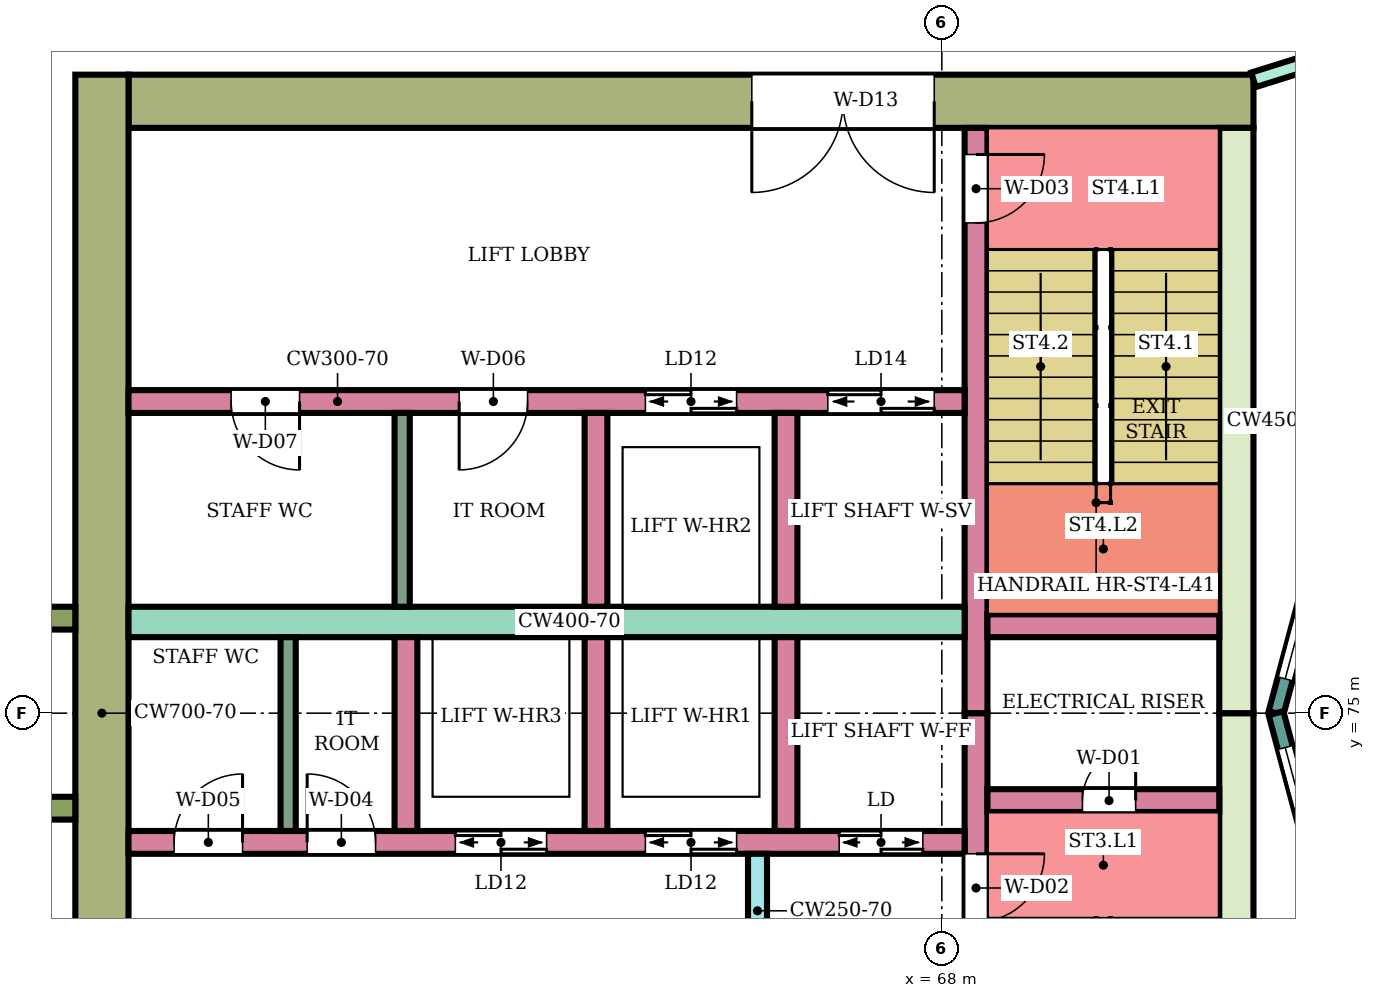
"""IFC4 building model, lengths in metres.
Left out: names, types, materials, properties, quantities, classifications, styles, units other than length and angle.
Written with IfcOpenShell. Run it as: python <this file> out.ifc"""

import sys

from ifc_helpers import new_model, si_unit, direction, frame, frame_2d, origin, place, context, subcontext, project, spatial, rectangle, extrude, element, fill, save


model = new_model("IFC4")
c1 = context("Model", 3, precision=1e-05, world=origin(), true_north=direction((0.0, 1.0)))
c2 = subcontext(c1, "Body", "Model", "MODEL_VIEW")
j1 = project(units=[si_unit("LENGTHUNIT", "METRE"), si_unit("PLANEANGLEUNIT", "RADIAN")], contexts=[c1])
p1 = place(None, origin())
s1 = spatial("IfcSite", under=j1, at=p1, CompositionType="ELEMENT")
p2 = place(p1, origin())
s2 = spatial("IfcBuilding", under=s1, at=p2, CompositionType="ELEMENT")
p3 = place(p2, frame((0.0, 0.0, 178.2)))
s3 = spatial("IfcBuildingStorey", under=s2, at=p3, CompositionType="ELEMENT", Elevation=178.2)
p4 = place(p3, frame((72.1, 83.05, 0.0), z_axis=(0.0, 0.0, 1.0), x_axis=(-1.0, 0.0, 0.0)))
e1 = element("IfcWall", 1, at=p4, inside=s3, PredefinedType="SHEAR", context=c2, shape_type="SweptSolid", body=[
    extrude(rectangle(XDim=14.8, YDim=0.7, at=frame_2d((7.4, 0.0))), origin(), (0.0, 0.0, 1.0), 3.78),
])
p5 = place(p4, frame((4.2, 0.0, 0.0)))
e2 = element("IfcOpeningElement", 2, at=p5, cuts=e1, PredefinedType="OPENING", context=c2, shape_type="SweptSolid", body=[
    extrude(rectangle(XDim=2.4, YDim=2.4, at=frame_2d((1.2, 1.2))), frame((0.0, 0.36, 0.0), z_axis=(0.0, -1.0, 0.0), x_axis=(1.0, 0.0, 0.0)), (0.0, 0.0, 1.0), 0.72),
])
for number, where, z_axis, x_axis in (
    (3, (71.875, 75.0, 0.0), (0.0, 0.0, 1.0), (0.0, -1.0, 0.0)),
    (4, (71.875, 82.7, 0.0), (0.0, 0.0, 1.0), (0.0, -1.0, 0.0)),
):
    element("IfcWall", number, at=place(p3, frame(where, z_axis=z_axis, x_axis=x_axis)), inside=s3, PredefinedType="SHEAR", context=c2, shape_type="SweptSolid", body=[
        extrude(rectangle(XDim=7.7, YDim=0.45, at=frame_2d((3.85, 0.0))), origin(), (0.0, 0.0, 1.0), 3.78),
    ])
p6 = place(p3, frame((56.95, 83.4, 0.0), z_axis=(0.0, 0.0, 1.0), x_axis=(0.0, -1.0, 0.0)))
e5 = element("IfcWall", 5, at=p6, inside=s3, PredefinedType="SHEAR", context=c2, shape_type="SweptSolid", body=[
    extrude(rectangle(XDim=16.8, YDim=0.7, at=frame_2d((8.4, 0.0))), origin(), (0.0, 0.0, 1.0), 3.78),
])
p7 = place(p3, frame((68.45, 75.0, 0.0), z_axis=(0.0, 0.0, 1.0), x_axis=(0.0, -1.0, 0.0)))
e6 = element("IfcWall", 6, at=p7, inside=s3, PredefinedType="SHEAR", context=c2, shape_type="SweptSolid", body=[
    extrude(rectangle(XDim=7.7, YDim=0.3, at=frame_2d((3.85, 0.0))), origin(), (0.0, 0.0, 1.0), 3.78),
])
p8 = place(p7, frame((1.85, 0.0, 0.0)))
e7 = element("IfcOpeningElement", 7, at=p8, cuts=e6, PredefinedType="OPENING", context=c2, shape_type="SweptSolid", body=[
    extrude(rectangle(XDim=0.9, YDim=2.1, at=frame_2d((0.45, 1.05))), frame((0.0, 0.16, 0.0), z_axis=(0.0, -1.0, 0.0), x_axis=(1.0, 0.0, 0.0)), (0.0, 0.0, 1.0), 0.32),
])
p9 = place(p3, frame((68.45, 82.7, 0.0), z_axis=(0.0, 0.0, 1.0), x_axis=(0.0, -1.0, 0.0)))
e8 = element("IfcWall", 8, at=p9, inside=s3, PredefinedType="SHEAR", context=c2, shape_type="SweptSolid", body=[
    extrude(rectangle(XDim=7.7, YDim=0.3, at=frame_2d((3.85, 0.0))), origin(), (0.0, 0.0, 1.0), 3.78),
])
p10 = place(p9, frame((0.35, 0.0, 0.0)))
e9 = element("IfcOpeningElement", 9, at=p10, cuts=e8, PredefinedType="OPENING", context=c2, shape_type="SweptSolid", body=[
    extrude(rectangle(XDim=0.9, YDim=2.1, at=frame_2d((0.45, 1.05))), frame((0.0, 0.16, 0.0), z_axis=(0.0, -1.0, 0.0), x_axis=(1.0, 0.0, 0.0)), (0.0, 0.0, 1.0), 0.32),
])
p11 = place(p3, frame((71.65, 73.85, 0.0), z_axis=(0.0, 0.0, 1.0), x_axis=(-1.0, 0.0, 0.0)))
e10 = element("IfcWall", 10, at=p11, inside=s3, PredefinedType="SHEAR", context=c2, shape_type="SweptSolid", body=[
    extrude(rectangle(XDim=3.05, YDim=0.3, at=frame_2d((1.525, 0.0))), origin(), (0.0, 0.0, 1.0), 3.78),
])
p12 = place(p11, frame((1.1, 0.0, 0.0)))
e11 = element("IfcOpeningElement", 11, at=p12, cuts=e10, PredefinedType="OPENING", context=c2, shape_type="SweptSolid", body=[
    extrude(rectangle(XDim=0.7, YDim=2.0, at=frame_2d((0.35, 1.0))), frame((0.0, 0.16, 0.0), z_axis=(0.0, -1.0, 0.0), x_axis=(1.0, 0.0, 0.0)), (0.0, 0.0, 1.0), 0.32),
])
p13 = place(p3, frame((71.65, 76.15, 0.0), z_axis=(0.0, 0.0, 1.0), x_axis=(-1.0, 0.0, 0.0)))
e12 = element("IfcWall", 12, at=p13, inside=s3, PredefinedType="SHEAR", context=c2, shape_type="SweptSolid", body=[
    extrude(rectangle(XDim=3.05, YDim=0.3, at=frame_2d((1.525, 0.0))), origin(), (0.0, 0.0, 1.0), 3.78),
])
p14 = place(p3, frame((68.3, 73.3, 0.0), z_axis=(0.0, 0.0, 1.0), x_axis=(-1.0, 0.0, 0.0)))
e13 = element("IfcWall", 13, at=p14, inside=s3, PredefinedType="SHEAR", context=c2, shape_type="SweptSolid", body=[
    extrude(rectangle(XDim=11.0, YDim=0.3, at=frame_2d((5.5, 0.0))), origin(), (0.0, 0.0, 1.0), 3.78),
])
p15 = place(p14, frame((0.55, 0.0, 0.0)))
e14 = element("IfcOpeningElement", 14, at=p15, cuts=e13, PredefinedType="OPENING", context=c2, shape_type="SweptSolid", body=[
    extrude(rectangle(XDim=1.1, YDim=2.1, at=frame_2d((0.55, 1.05))), frame((0.0, 0.16, 0.0), z_axis=(0.0, -1.0, 0.0), x_axis=(1.0, 0.0, 0.0)), (0.0, 0.0, 1.0), 0.32),
])
p16 = place(p14, frame((3.0, 0.0, 0.0)))
e15 = element("IfcOpeningElement", 15, at=p16, cuts=e13, PredefinedType="OPENING", context=c2, shape_type="SweptSolid", body=[
    extrude(rectangle(XDim=1.2, YDim=2.1, at=frame_2d((0.6, 1.05))), frame((0.0, 0.16, 0.0), z_axis=(0.0, -1.0, 0.0), x_axis=(1.0, 0.0, 0.0)), (0.0, 0.0, 1.0), 0.32),
])
p17 = place(p14, frame((5.5, 0.0, 0.0)))
e16 = element("IfcOpeningElement", 16, at=p17, cuts=e13, PredefinedType="OPENING", context=c2, shape_type="SweptSolid", body=[
    extrude(rectangle(XDim=1.2, YDim=2.1, at=frame_2d((0.6, 1.05))), frame((0.0, 0.16, 0.0), z_axis=(0.0, -1.0, 0.0), x_axis=(1.0, 0.0, 0.0)), (0.0, 0.0, 1.0), 0.32),
])
p18 = place(p14, frame((7.75, 0.0, 0.0)))
e17 = element("IfcOpeningElement", 17, at=p18, cuts=e13, PredefinedType="OPENING", context=c2, shape_type="SweptSolid", body=[
    extrude(rectangle(XDim=0.9, YDim=2.1, at=frame_2d((0.45, 1.05))), frame((0.0, 0.16, 0.0), z_axis=(0.0, -1.0, 0.0), x_axis=(1.0, 0.0, 0.0)), (0.0, 0.0, 1.0), 0.32),
])
p19 = place(p14, frame((9.5, 0.0, 0.0)))
e18 = element("IfcOpeningElement", 18, at=p19, cuts=e13, PredefinedType="OPENING", context=c2, shape_type="SweptSolid", body=[
    extrude(rectangle(XDim=0.9, YDim=2.1, at=frame_2d((0.45, 1.05))), frame((0.0, 0.16, 0.0), z_axis=(0.0, -1.0, 0.0), x_axis=(1.0, 0.0, 0.0)), (0.0, 0.0, 1.0), 0.32),
])
p20 = place(p3, frame((68.3, 76.2, 0.0), z_axis=(0.0, 0.0, 1.0), x_axis=(-1.0, 0.0, 0.0)))
e19 = element("IfcWall", 19, at=p20, inside=s3, PredefinedType="SHEAR", context=c2, shape_type="SweptSolid", body=[
    extrude(rectangle(XDim=11.0, YDim=0.4, at=frame_2d((5.5, 0.0))), origin(), (0.0, 0.0, 1.0), 3.78),
])
p21 = place(p3, frame((68.3, 79.1, 0.0), z_axis=(0.0, 0.0, 1.0), x_axis=(-1.0, 0.0, 0.0)))
e20 = element("IfcWall", 20, at=p21, inside=s3, PredefinedType="SHEAR", context=c2, shape_type="SweptSolid", body=[
    extrude(rectangle(XDim=11.0, YDim=0.3, at=frame_2d((5.5, 0.0))), origin(), (0.0, 0.0, 1.0), 3.78),
])
p22 = place(p21, frame((0.4, 0.0, 0.0)))
e21 = element("IfcOpeningElement", 21, at=p22, cuts=e20, PredefinedType="OPENING", context=c2, shape_type="SweptSolid", body=[
    extrude(rectangle(XDim=1.4, YDim=2.1, at=frame_2d((0.7, 1.05))), frame((0.0, 0.16, 0.0), z_axis=(0.0, -1.0, 0.0), x_axis=(1.0, 0.0, 0.0)), (0.0, 0.0, 1.0), 0.32),
])
p23 = place(p21, frame((3.0, 0.0, 0.0)))
e22 = element("IfcOpeningElement", 22, at=p23, cuts=e20, PredefinedType="OPENING", context=c2, shape_type="SweptSolid", body=[
    extrude(rectangle(XDim=1.2, YDim=2.1, at=frame_2d((0.6, 1.05))), frame((0.0, 0.16, 0.0), z_axis=(0.0, -1.0, 0.0), x_axis=(1.0, 0.0, 0.0)), (0.0, 0.0, 1.0), 0.32),
])
p24 = place(p21, frame((5.75, 0.0, 0.0)))
e23 = element("IfcOpeningElement", 23, at=p24, cuts=e20, PredefinedType="OPENING", context=c2, shape_type="SweptSolid", body=[
    extrude(rectangle(XDim=0.9, YDim=2.1, at=frame_2d((0.45, 1.05))), frame((0.0, 0.16, 0.0), z_axis=(0.0, -1.0, 0.0), x_axis=(1.0, 0.0, 0.0)), (0.0, 0.0, 1.0), 0.32),
])
p25 = place(p21, frame((8.75, 0.0, 0.0)))
e24 = element("IfcOpeningElement", 24, at=p25, cuts=e20, PredefinedType="OPENING", context=c2, shape_type="SweptSolid", body=[
    extrude(rectangle(XDim=0.9, YDim=2.1, at=frame_2d((0.45, 1.05))), frame((0.0, 0.16, 0.0), z_axis=(0.0, -1.0, 0.0), x_axis=(1.0, 0.0, 0.0)), (0.0, 0.0, 1.0), 0.32),
])
for number, where, z_axis, x_axis in (
    (25, (65.95, 76.0, 0.0), (0.0, 0.0, 1.0), (0.0, -1.0, 0.0)),
    (26, (63.45, 76.0, 0.0), (0.0, 0.0, 1.0), (0.0, -1.0, 0.0)),
    (27, (60.95, 76.0, 0.0), (0.0, 0.0, 1.0), (0.0, -1.0, 0.0)),
    (28, (65.95, 78.95, 0.0), (0.0, 0.0, 1.0), (0.0, -1.0, 0.0)),
    (29, (63.45, 78.95, 0.0), (0.0, 0.0, 1.0), (0.0, -1.0, 0.0)),
):
    element("IfcWall", number, at=place(p3, frame(where, z_axis=z_axis, x_axis=x_axis)), inside=s3, PredefinedType="SHEAR", context=c2, shape_type="SweptSolid", body=[
        extrude(rectangle(XDim=2.55, YDim=0.3, at=frame_2d((1.275, 0.0))), origin(), (0.0, 0.0, 1.0), 3.78),
    ])
p26 = place(p3, frame((65.575, 73.15, 0.0), z_axis=(0.0, 0.0, 1.0), x_axis=(0.0, -1.0, 0.0)))
e30 = element("IfcWall", 30, at=p26, inside=s3, PredefinedType="SHEAR", context=c2, shape_type="SweptSolid", body=[
    extrude(rectangle(XDim=1.5, YDim=0.25, at=frame_2d((0.75, 0.0))), origin(), (0.0, 0.0, 1.0), 3.78),
])
for number, where, z_axis, x_axis in (
    (31, (56.6, 76.25, 0.0), (0.0, 0.0, 1.0), (-1.0, 0.0, 0.0)),
    (32, (56.6, 73.75, 0.0), (0.0, 0.0, 1.0), (-1.0, 0.0, 0.0)),
):
    element("IfcWall", number, at=place(p3, frame(where, z_axis=z_axis, x_axis=x_axis)), inside=s3, PredefinedType="NOTDEFINED", context=c2, shape_type="SweptSolid", body=[
        extrude(rectangle(XDim=2.416, YDim=0.3, at=frame_2d((1.208, 0.0))), origin(), (0.0, 0.0, 1.0), 4.1),
    ])
p27 = place(p3, frame((73.415, 78.802, 0.0), z_axis=(0.0, 0.0, 1.0), x_axis=(-0.258789828301, -0.965933654434, 0.0)))
e33 = element("IfcWall", 33, at=p27, inside=s3, PredefinedType="NOTDEFINED", context=c2, shape_type="SweptSolid", body=[
    extrude(rectangle(XDim=3.936, YDim=0.2, at=frame_2d((1.968, 0.0))), origin(), (0.0, 0.0, 1.0), 4.1),
])
p28 = place(p27, frame((0.468, 0.0, 0.9)))
e34 = element("IfcOpeningElement", 34, at=p28, cuts=e33, PredefinedType="OPENING", context=c2, shape_type="SweptSolid", body=[
    extrude(rectangle(XDim=3.0, YDim=2.3, at=frame_2d((1.5, 1.15))), frame((0.0, 0.11, 0.0), z_axis=(0.0, -1.0, 0.0), x_axis=(1.0, 0.0, 0.0)), (0.0, 0.0, 1.0), 0.22),
])
p29 = place(p3, frame((72.396, 75.0, 0.0), z_axis=(0.0, 0.0, 1.0), x_axis=(0.258789828301, -0.965933654434, 0.0)))
e35 = element("IfcWall", 35, at=p29, inside=s3, PredefinedType="NOTDEFINED", context=c2, shape_type="SweptSolid", body=[
    extrude(rectangle(XDim=3.936, YDim=0.2, at=frame_2d((1.968, 0.0))), origin(), (0.0, 0.0, 1.0), 4.1),
])
p30 = place(p29, frame((0.468, 0.0, 0.9)))
e36 = element("IfcOpeningElement", 36, at=p30, cuts=e35, PredefinedType="OPENING", context=c2, shape_type="SweptSolid", body=[
    extrude(rectangle(XDim=3.0, YDim=2.3, at=frame_2d((1.5, 1.15))), frame((0.0, 0.11, 0.0), z_axis=(0.0, -1.0, 0.0), x_axis=(1.0, 0.0, 0.0)), (0.0, 0.0, 1.0), 0.22),
])
p31 = place(p3, frame((72.1, 83.332, 0.0), z_axis=(0.0, 0.0, 1.0), x_axis=(0.954233106619, 0.299063836383, 0.0)))
e37 = element("IfcWall", 37, at=p31, inside=s3, PredefinedType="PARTITIONING", context=c2, shape_type="SweptSolid", body=[
    extrude(rectangle(XDim=2.414, YDim=0.2, at=frame_2d((1.207, 0.0))), origin(), (0.0, 0.0, 1.0), 3.65),
])
p32 = place(p31, frame((0.762, 0.0, 0.0)))
e38 = element("IfcOpeningElement", 38, at=p32, cuts=e37, PredefinedType="OPENING", context=c2, shape_type="SweptSolid", body=[
    extrude(rectangle(XDim=0.9, YDim=2.1, at=frame_2d((0.45, 1.05))), frame((0.0, 0.11, 0.0), z_axis=(0.0, -1.0, 0.0), x_axis=(1.0, 0.0, 0.0)), (0.0, 0.0, 1.0), 0.22),
])
for number, where, z_axis, x_axis in (
    (39, (59.4, 76.0, 0.0), (0.0, 0.0, 1.0), (0.0, -1.0, 0.0)),
    (40, (60.9, 78.95, 0.0), (0.0, 0.0, 1.0), (0.0, -1.0, 0.0)),
):
    element("IfcWall", number, at=place(p3, frame(where, z_axis=z_axis, x_axis=x_axis)), inside=s3, PredefinedType="PARTITIONING", context=c2, shape_type="SweptSolid", body=[
        extrude(rectangle(XDim=2.55, YDim=0.2, at=frame_2d((1.275, 0.0))), origin(), (0.0, 0.0, 1.0), 3.78),
    ])
p33 = place(p28, origin())
e41 = element("IfcWindow", 41, at=p33, inside=s3, PartitioningType="SINGLE_PANEL", PredefinedType="WINDOW", context=c2, shape_type="SweptSolid", body=[
    extrude(rectangle(XDim=3.0, YDim=2.3, at=frame_2d((1.5, 1.15))), frame((0.0, 0.03, 0.0), z_axis=(0.0, -1.0, 0.0), x_axis=(1.0, 0.0, 0.0)), (0.0, 0.0, 1.0), 0.06),
])
fill(e34, e41)
p34 = place(p30, origin())
e42 = element("IfcWindow", 42, at=p34, inside=s3, PartitioningType="SINGLE_PANEL", PredefinedType="WINDOW", context=c2, shape_type="SweptSolid", body=[
    extrude(rectangle(XDim=3.0, YDim=2.3, at=frame_2d((1.5, 1.15))), frame((0.0, 0.03, 0.0), z_axis=(0.0, -1.0, 0.0), x_axis=(1.0, 0.0, 0.0)), (0.0, 0.0, 1.0), 0.06),
])
fill(e36, e42)
p35 = place(p12, frame((0.7, 0.0, 0.0), z_axis=(0.0, 0.0, 1.0), x_axis=(-1.0, 0.0, 0.0)))
e43 = element("IfcDoor", 43, at=p35, inside=s3, OperationType="SINGLE_SWING_RIGHT", PredefinedType="DOOR", context=c2, shape_type="SweptSolid", body=[
    extrude(rectangle(XDim=0.7, YDim=2.0, at=frame_2d((0.35, 1.0))), frame((0.0, 0.025, 0.0), z_axis=(0.0, -1.0, 0.0), x_axis=(1.0, 0.0, 0.0)), (0.0, 0.0, 1.0), 0.05),
])
fill(e11, e43)
p36 = place(p8, origin())
e44 = element("IfcDoor", 44, at=p36, inside=s3, OperationType="SINGLE_SWING_LEFT", PredefinedType="DOOR", context=c2, shape_type="SweptSolid", body=[
    extrude(rectangle(XDim=0.9, YDim=2.1, at=frame_2d((0.45, 1.05))), frame((0.0, 0.025, 0.0), z_axis=(0.0, -1.0, 0.0), x_axis=(1.0, 0.0, 0.0)), (0.0, 0.0, 1.0), 0.05),
])
fill(e7, e44)
p37 = place(p10, origin())
e45 = element("IfcDoor", 45, at=p37, inside=s3, OperationType="SINGLE_SWING_LEFT", PredefinedType="DOOR", context=c2, shape_type="SweptSolid", body=[
    extrude(rectangle(XDim=0.9, YDim=2.1, at=frame_2d((0.45, 1.05))), frame((0.0, 0.025, 0.0), z_axis=(0.0, -1.0, 0.0), x_axis=(1.0, 0.0, 0.0)), (0.0, 0.0, 1.0), 0.05),
])
fill(e9, e45)
p38 = place(p15, origin())
e46 = element("IfcDoor", 46, at=p38, inside=s3, OperationType="DOUBLE_DOOR_SLIDING", PredefinedType="DOOR", context=c2, shape_type="SweptSolid", body=[
    extrude(rectangle(XDim=1.1, YDim=2.1, at=frame_2d((0.55, 1.05))), frame((0.0, 0.025, 0.0), z_axis=(0.0, -1.0, 0.0), x_axis=(1.0, 0.0, 0.0)), (0.0, 0.0, 1.0), 0.05),
])
fill(e14, e46)
p39 = place(p16, origin())
e47 = element("IfcDoor", 47, at=p39, inside=s3, OperationType="DOUBLE_DOOR_SLIDING", PredefinedType="DOOR", context=c2, shape_type="SweptSolid", body=[
    extrude(rectangle(XDim=1.2, YDim=2.1, at=frame_2d((0.6, 1.05))), frame((0.0, 0.025, 0.0), z_axis=(0.0, -1.0, 0.0), x_axis=(1.0, 0.0, 0.0)), (0.0, 0.0, 1.0), 0.05),
])
fill(e15, e47)
p40 = place(p17, origin())
e48 = element("IfcDoor", 48, at=p40, inside=s3, OperationType="DOUBLE_DOOR_SLIDING", PredefinedType="DOOR", context=c2, shape_type="SweptSolid", body=[
    extrude(rectangle(XDim=1.2, YDim=2.1, at=frame_2d((0.6, 1.05))), frame((0.0, 0.025, 0.0), z_axis=(0.0, -1.0, 0.0), x_axis=(1.0, 0.0, 0.0)), (0.0, 0.0, 1.0), 0.05),
])
fill(e16, e48)
p41 = place(p18, frame((0.9, 0.0, 0.0), z_axis=(0.0, 0.0, 1.0), x_axis=(-1.0, 0.0, 0.0)))
e49 = element("IfcDoor", 49, at=p41, inside=s3, OperationType="SINGLE_SWING_LEFT", PredefinedType="DOOR", context=c2, shape_type="SweptSolid", body=[
    extrude(rectangle(XDim=0.9, YDim=2.1, at=frame_2d((0.45, 1.05))), frame((0.0, 0.025, 0.0), z_axis=(0.0, -1.0, 0.0), x_axis=(1.0, 0.0, 0.0)), (0.0, 0.0, 1.0), 0.05),
])
fill(e17, e49)
p42 = place(p19, frame((0.9, 0.0, 0.0), z_axis=(0.0, 0.0, 1.0), x_axis=(-1.0, 0.0, 0.0)))
e50 = element("IfcDoor", 50, at=p42, inside=s3, OperationType="SINGLE_SWING_RIGHT", PredefinedType="DOOR", context=c2, shape_type="SweptSolid", body=[
    extrude(rectangle(XDim=0.9, YDim=2.1, at=frame_2d((0.45, 1.05))), frame((0.0, 0.025, 0.0), z_axis=(0.0, -1.0, 0.0), x_axis=(1.0, 0.0, 0.0)), (0.0, 0.0, 1.0), 0.05),
])
fill(e18, e50)
p43 = place(p22, origin())
e51 = element("IfcDoor", 51, at=p43, inside=s3, OperationType="DOUBLE_DOOR_SLIDING", PredefinedType="DOOR", context=c2, shape_type="SweptSolid", body=[
    extrude(rectangle(XDim=1.4, YDim=2.1, at=frame_2d((0.7, 1.05))), frame((0.0, 0.025, 0.0), z_axis=(0.0, -1.0, 0.0), x_axis=(1.0, 0.0, 0.0)), (0.0, 0.0, 1.0), 0.05),
])
fill(e21, e51)
p44 = place(p23, origin())
e52 = element("IfcDoor", 52, at=p44, inside=s3, OperationType="DOUBLE_DOOR_SLIDING", PredefinedType="DOOR", context=c2, shape_type="SweptSolid", body=[
    extrude(rectangle(XDim=1.2, YDim=2.1, at=frame_2d((0.6, 1.05))), frame((0.0, 0.025, 0.0), z_axis=(0.0, -1.0, 0.0), x_axis=(1.0, 0.0, 0.0)), (0.0, 0.0, 1.0), 0.05),
])
fill(e22, e52)
p45 = place(p24, origin())
e53 = element("IfcDoor", 53, at=p45, inside=s3, OperationType="SINGLE_SWING_RIGHT", PredefinedType="DOOR", context=c2, shape_type="SweptSolid", body=[
    extrude(rectangle(XDim=0.9, YDim=2.1, at=frame_2d((0.45, 1.05))), frame((0.0, 0.025, 0.0), z_axis=(0.0, -1.0, 0.0), x_axis=(1.0, 0.0, 0.0)), (0.0, 0.0, 1.0), 0.05),
])
fill(e23, e53)
p46 = place(p25, origin())
e54 = element("IfcDoor", 54, at=p46, inside=s3, OperationType="SINGLE_SWING_LEFT", PredefinedType="DOOR", context=c2, shape_type="SweptSolid", body=[
    extrude(rectangle(XDim=0.9, YDim=2.1, at=frame_2d((0.45, 1.05))), frame((0.0, 0.025, 0.0), z_axis=(0.0, -1.0, 0.0), x_axis=(1.0, 0.0, 0.0)), (0.0, 0.0, 1.0), 0.05),
])
fill(e24, e54)
p47 = place(p5, origin())
e55 = element("IfcDoor", 55, at=p47, inside=s3, OperationType="DOUBLE_DOOR_SINGLE_SWING", PredefinedType="DOOR", context=c2, shape_type="SweptSolid", body=[
    extrude(rectangle(XDim=2.4, YDim=2.4, at=frame_2d((1.2, 1.2))), frame((0.0, 0.025, 0.0), z_axis=(0.0, -1.0, 0.0), x_axis=(1.0, 0.0, 0.0)), (0.0, 0.0, 1.0), 0.05),
])
fill(e2, e55)
save(model, sys.argv[1])
